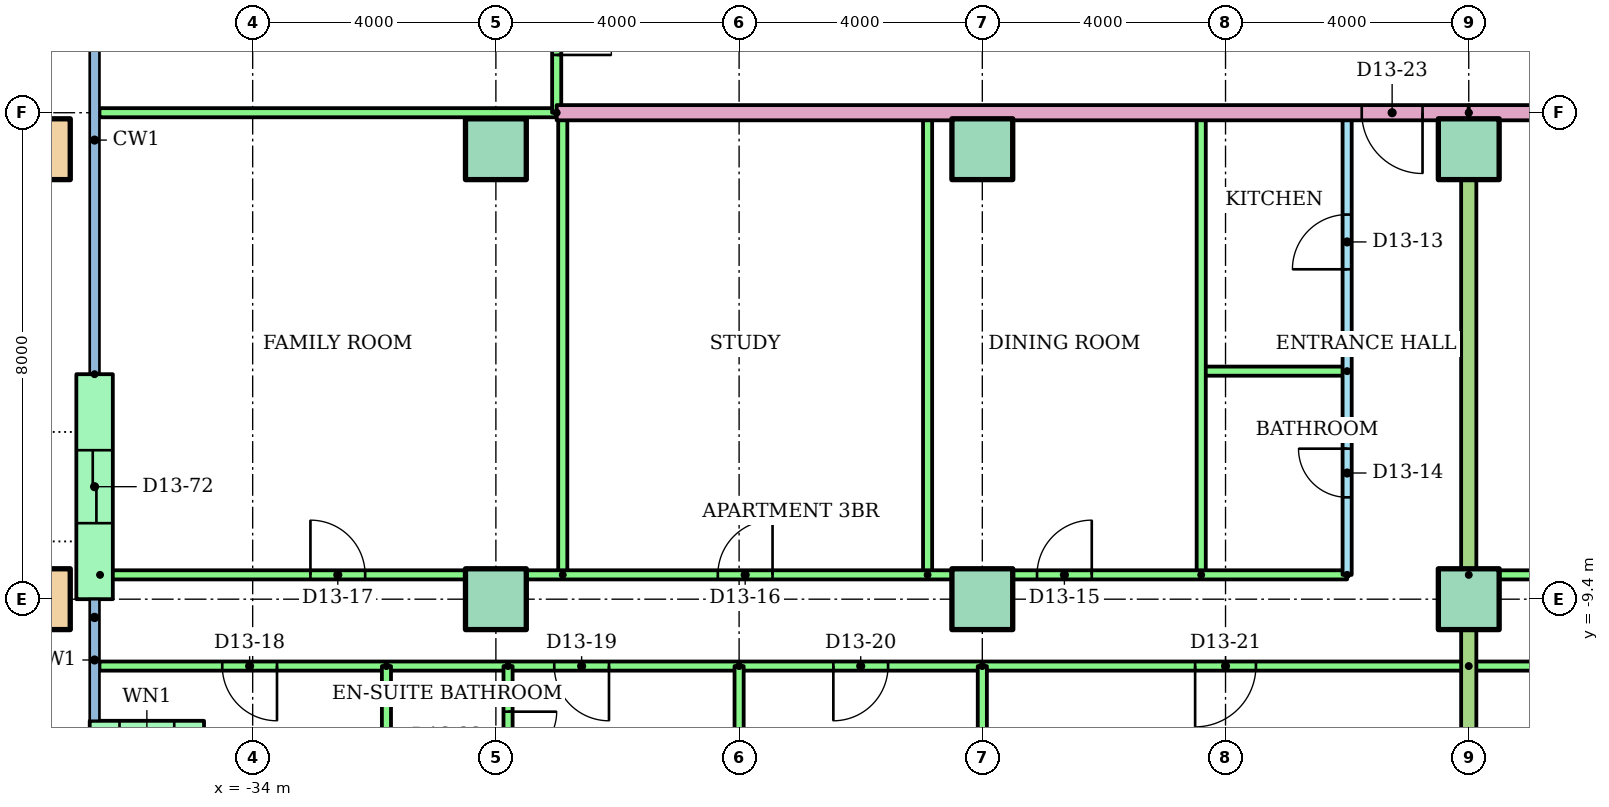
"""IFC4 building model, lengths in metres.
Left out: names, types, materials, properties, quantities, classifications, styles, units other than length and angle.
Written with IfcOpenShell. Run it as: python <this file> out.ifc"""

import sys

from ifc_helpers import new_model, si_unit, direction, frame, frame_2d, origin, origin_2d, place, context, subcontext, project, spatial, rectangle, hollow_rectangle, extrude, element, fill, save


model = new_model("IFC4")
c1 = context("Model", 3, precision=1e-05, world=origin(), true_north=direction((0.0, 1.0)))
c2 = subcontext(c1, "Body", "Model", "MODEL_VIEW")
j1 = project(units=[si_unit("LENGTHUNIT", "METRE"), si_unit("PLANEANGLEUNIT", "RADIAN")], contexts=[c1])
p1 = place(None, origin())
s1 = spatial("IfcSite", under=j1, at=p1, CompositionType="ELEMENT")
p2 = place(p1, origin())
s2 = spatial("IfcBuilding", under=s1, at=p2, CompositionType="ELEMENT")
p3 = place(p2, frame((0.0, 0.0, 51.2)))
s3 = spatial("IfcBuildingStorey", under=s2, at=p3, CompositionType="ELEMENT", Elevation=51.2)
p4 = place(p3, frame((-37.5, -9.4, 0.0)))
e1 = element("IfcColumn", 1, at=p4, inside=s3, PredefinedType="COLUMN", context=c2, shape_type="SweptSolid", body=[
    extrude(hollow_rectangle(XDim=1.0, YDim=1.0, WallThickness=0.05, at=origin_2d()), origin(), (0.0, 0.0, 1.0), 3.2),
])
for number, where in (
    (2, (-30.0, -9.4, 0.0)),
    (3, (-22.0, -9.4, 0.0)),
    (4, (-14.0, -9.4, 0.0)),
):
    element("IfcColumn", number, at=place(p3, frame(where)), inside=s3, PredefinedType="COLUMN", context=c2, shape_type="SweptSolid", body=[
        extrude(rectangle(XDim=1.0, YDim=1.0, at=origin_2d()), origin(), (0.0, 0.0, 1.0), 3.2),
    ])
p5 = place(p3, frame((-37.5, -2.0, 0.0)))
e5 = element("IfcColumn", 5, at=p5, inside=s3, PredefinedType="COLUMN", context=c2, shape_type="SweptSolid", body=[
    extrude(hollow_rectangle(XDim=1.0, YDim=1.0, WallThickness=0.05, at=origin_2d()), origin(), (0.0, 0.0, 1.0), 3.2),
])
for number, where in (
    (6, (-30.0, -2.0, 0.0)),
    (7, (-22.0, -2.0, 0.0)),
    (8, (-14.0, -2.0, 0.0)),
):
    element("IfcColumn", number, at=place(p3, frame(where)), inside=s3, PredefinedType="COLUMN", context=c2, shape_type="SweptSolid", body=[
        extrude(rectangle(XDim=1.0, YDim=1.0, at=origin_2d()), origin(), (0.0, 0.0, 1.0), 3.2),
    ])
p6 = place(p3, frame((-36.6, -5.7, 0.0), z_axis=(0.0, 0.0, 1.0), x_axis=(0.0, -1.0, 0.0)))
e9 = element("IfcWall", 9, at=p6, inside=s3, PredefinedType="STANDARD", context=c2, shape_type="SweptSolid", body=[
    extrude(rectangle(XDim=3.7, YDim=0.6, at=frame_2d((1.85, 0.0))), origin(), (0.0, 0.0, 1.0), 2.92),
])
p7 = place(p6, frame((1.25, 0.0, 0.0)))
e10 = element("IfcOpeningElement", 10, at=p7, cuts=e9, PredefinedType="OPENING", context=c2, shape_type="SweptSolid", body=[
    extrude(rectangle(XDim=1.2, YDim=2.1, at=frame_2d((0.6, 1.05))), frame((0.0, 0.31, 0.0), z_axis=(0.0, -1.0, 0.0), x_axis=(1.0, 0.0, 0.0)), (0.0, 0.0, 1.0), 0.62),
])
p8 = place(p3, frame((-36.68, -11.7, 0.0)))
e11 = element("IfcWall", 11, at=p8, inside=s3, PredefinedType="STANDARD", context=c2, shape_type="SweptSolid", body=[
    extrude(rectangle(XDim=1.88, YDim=0.6, at=frame_2d((0.94, 0.0))), origin(), (0.0, 0.0, 1.0), 2.92),
])
p9 = place(p8, frame((0.49, 0.0, 0.9)))
e12 = element("IfcOpeningElement", 12, at=p9, cuts=e11, PredefinedType="OPENING", context=c2, shape_type="SweptSolid", body=[
    extrude(rectangle(XDim=0.9, YDim=1.5, at=frame_2d((0.45, 0.75))), frame((0.0, 0.31, 0.0), z_axis=(0.0, -1.0, 0.0), x_axis=(1.0, 0.0, 0.0)), (0.0, 0.0, 1.0), 0.62),
])
p10 = place(p3, frame((-16.0, -9.0, 0.0), z_axis=(0.0, 0.0, 1.0), x_axis=(0.0, 1.0, 0.0)))
e13 = element("IfcWall", 13, at=p10, inside=s3, PredefinedType="PARTITIONING", context=c2, shape_type="SweptSolid", body=[
    extrude(rectangle(XDim=7.6, YDim=0.15, at=frame_2d((3.8, 0.0))), origin(), (0.0, 0.0, 1.0), 2.4),
])
p11 = place(p10, frame((5.025, 0.0, 0.0)))
e14 = element("IfcOpeningElement", 14, at=p11, cuts=e13, PredefinedType="OPENING", context=c2, shape_type="SweptSolid", body=[
    extrude(rectangle(XDim=0.9, YDim=2.1, at=frame_2d((0.45, 1.05))), frame((0.0, 0.085, 0.0), z_axis=(0.0, -1.0, 0.0), x_axis=(1.0, 0.0, 0.0)), (0.0, 0.0, 1.0), 0.17),
])
p12 = place(p10, frame((1.275, 0.0, 0.0)))
e15 = element("IfcOpeningElement", 15, at=p12, cuts=e13, PredefinedType="OPENING", context=c2, shape_type="SweptSolid", body=[
    extrude(rectangle(XDim=0.8, YDim=2.1, at=frame_2d((0.4, 1.05))), frame((0.0, 0.085, 0.0), z_axis=(0.0, -1.0, 0.0), x_axis=(1.0, 0.0, 0.0)), (0.0, 0.0, 1.0), 0.17),
])
p13 = place(p3, frame((-16.0, -5.65, 0.0), z_axis=(0.0, 0.0, 1.0), x_axis=(-1.0, 0.0, 0.0)))
e16 = element("IfcWall", 16, at=p13, inside=s3, PredefinedType="PARTITIONING", context=c2, shape_type="SweptSolid", body=[
    extrude(rectangle(XDim=2.4, YDim=0.15, at=frame_2d((1.2, 0.0))), origin(), (0.0, 0.0, 1.0), 2.4),
])
for number, where, z_axis, x_axis in (
    (17, (-18.4, -9.0, 0.0), (0.0, 0.0, 1.0), (0.0, 1.0, 0.0)),
    (18, (-22.9, -9.0, 0.0), (0.0, 0.0, 1.0), (0.0, 1.0, 0.0)),
    (19, (-28.9, -9.0, 0.0), (0.0, 0.0, 1.0), (0.0, 1.0, 0.0)),
):
    element("IfcWall", number, at=place(p3, frame(where, z_axis=z_axis, x_axis=x_axis)), inside=s3, PredefinedType="PARTITIONING", context=c2, shape_type="SweptSolid", body=[
        extrude(rectangle(XDim=7.6, YDim=0.15, at=frame_2d((3.8, 0.0))), origin(), (0.0, 0.0, 1.0), 2.4),
    ])
p14 = place(p3, frame((-36.51, -9.0, 0.0)))
e20 = element("IfcWall", 20, at=p14, inside=s3, PredefinedType="PARTITIONING", context=c2, shape_type="SweptSolid", body=[
    extrude(rectangle(XDim=20.51, YDim=0.15, at=frame_2d((10.255, 0.0))), origin(), (0.0, 0.0, 1.0), 2.4),
])
p15 = place(p14, frame((15.41, 0.0, 0.0)))
e21 = element("IfcOpeningElement", 21, at=p15, cuts=e20, PredefinedType="OPENING", context=c2, shape_type="SweptSolid", body=[
    extrude(rectangle(XDim=0.9, YDim=2.1, at=frame_2d((0.45, 1.05))), frame((0.0, 0.085, 0.0), z_axis=(0.0, -1.0, 0.0), x_axis=(1.0, 0.0, 0.0)), (0.0, 0.0, 1.0), 0.17),
])
p16 = place(p14, frame((10.16, 0.0, 0.0)))
e22 = element("IfcOpeningElement", 22, at=p16, cuts=e20, PredefinedType="OPENING", context=c2, shape_type="SweptSolid", body=[
    extrude(rectangle(XDim=0.9, YDim=2.1, at=frame_2d((0.45, 1.05))), frame((0.0, 0.085, 0.0), z_axis=(0.0, -1.0, 0.0), x_axis=(1.0, 0.0, 0.0)), (0.0, 0.0, 1.0), 0.17),
])
p17 = place(p14, frame((3.46, 0.0, 0.0)))
e23 = element("IfcOpeningElement", 23, at=p17, cuts=e20, PredefinedType="OPENING", context=c2, shape_type="SweptSolid", body=[
    extrude(rectangle(XDim=0.9, YDim=2.1, at=frame_2d((0.45, 1.05))), frame((0.0, 0.085, 0.0), z_axis=(0.0, -1.0, 0.0), x_axis=(1.0, 0.0, 0.0)), (0.0, 0.0, 1.0), 0.17),
])
p18 = place(p3, frame((-14.0, -10.5, 0.0), z_axis=(0.0, 0.0, 1.0), x_axis=(-1.0, 0.0, 0.0)))
e24 = element("IfcWall", 24, at=p18, inside=s3, PredefinedType="PARTITIONING", context=c2, shape_type="SweptSolid", body=[
    extrude(rectangle(XDim=22.52, YDim=0.15, at=frame_2d((11.26, 0.0))), origin(), (0.0, 0.0, 1.0), 2.4),
])
p19 = place(p18, frame((19.6, 0.0, 0.0)))
e25 = element("IfcOpeningElement", 25, at=p19, cuts=e24, PredefinedType="OPENING", context=c2, shape_type="SweptSolid", body=[
    extrude(rectangle(XDim=0.9, YDim=2.1, at=frame_2d((0.45, 1.05))), frame((0.0, 0.085, 0.0), z_axis=(0.0, -1.0, 0.0), x_axis=(1.0, 0.0, 0.0)), (0.0, 0.0, 1.0), 0.17),
])
p20 = place(p18, frame((14.14, 0.0, 0.0)))
e26 = element("IfcOpeningElement", 26, at=p20, cuts=e24, PredefinedType="OPENING", context=c2, shape_type="SweptSolid", body=[
    extrude(rectangle(XDim=0.9, YDim=2.1, at=frame_2d((0.45, 1.05))), frame((0.0, 0.085, 0.0), z_axis=(0.0, -1.0, 0.0), x_axis=(1.0, 0.0, 0.0)), (0.0, 0.0, 1.0), 0.17),
])
p21 = place(p18, frame((9.55, 0.0, 0.0)))
e27 = element("IfcOpeningElement", 27, at=p21, cuts=e24, PredefinedType="OPENING", context=c2, shape_type="SweptSolid", body=[
    extrude(rectangle(XDim=0.9, YDim=2.1, at=frame_2d((0.45, 1.05))), frame((0.0, 0.085, 0.0), z_axis=(0.0, -1.0, 0.0), x_axis=(1.0, 0.0, 0.0)), (0.0, 0.0, 1.0), 0.17),
])
p22 = place(p18, frame((3.5, 0.0, 0.0)))
e28 = element("IfcOpeningElement", 28, at=p22, cuts=e24, PredefinedType="OPENING", context=c2, shape_type="SweptSolid", body=[
    extrude(rectangle(XDim=1.0, YDim=2.1, at=frame_2d((0.5, 1.05))), frame((0.0, 0.085, 0.0), z_axis=(0.0, -1.0, 0.0), x_axis=(1.0, 0.0, 0.0)), (0.0, 0.0, 1.0), 0.17),
])
p23 = place(p3, frame((-31.8, -10.5, 0.0), z_axis=(0.0, 0.0, 1.0), x_axis=(0.0, -1.0, 0.0)))
e29 = element("IfcWall", 29, at=p23, inside=s3, PredefinedType="PARTITIONING", context=c2, shape_type="SweptSolid", body=[
    extrude(rectangle(XDim=3.82, YDim=0.15, at=frame_2d((1.91, 0.0))), origin(), (0.0, 0.0, 1.0), 2.4),
])
p24 = place(p3, frame((-26.0, -10.5, 0.0), z_axis=(0.0, 0.0, 1.0), x_axis=(0.0, -1.0, 0.0)))
e30 = element("IfcWall", 30, at=p24, inside=s3, PredefinedType="PARTITIONING", context=c2, shape_type="SweptSolid", body=[
    extrude(rectangle(XDim=5.621, YDim=0.15, at=frame_2d((2.811, 0.0))), origin(), (0.0, 0.0, 1.0), 2.4),
])
p25 = place(p3, frame((-22.0, -10.5, 0.0), z_axis=(0.0, 0.0, 1.0), x_axis=(0.0, -1.0, 0.0)))
e31 = element("IfcWall", 31, at=p25, inside=s3, PredefinedType="PARTITIONING", context=c2, shape_type="SweptSolid", body=[
    extrude(rectangle(XDim=5.61, YDim=0.15, at=frame_2d((2.805, 0.0))), origin(), (0.0, 0.0, 1.0), 2.4),
])
p26 = place(p3, frame((-29.8, -10.5, 0.0), z_axis=(0.0, 0.0, 1.0), x_axis=(0.0, -1.0, 0.0)))
e32 = element("IfcWall", 32, at=p26, inside=s3, PredefinedType="PARTITIONING", context=c2, shape_type="SweptSolid", body=[
    extrude(rectangle(XDim=2.3, YDim=0.15, at=frame_2d((1.15, 0.0))), origin(), (0.0, 0.0, 1.0), 2.4),
])
p27 = place(p26, frame((0.75, 0.0, 0.0)))
e33 = element("IfcOpeningElement", 33, at=p27, cuts=e32, PredefinedType="OPENING", context=c2, shape_type="SweptSolid", body=[
    extrude(rectangle(XDim=0.8, YDim=2.1, at=frame_2d((0.4, 1.05))), frame((0.0, 0.085, 0.0), z_axis=(0.0, -1.0, 0.0), x_axis=(1.0, 0.0, 0.0)), (0.0, 0.0, 1.0), 0.17),
])
p28 = place(p3, frame((-14.0, -9.0, 0.0)))
e34 = element("IfcWall", 34, at=p28, inside=s3, PredefinedType="PARTITIONING", context=c2, shape_type="SweptSolid", body=[
    extrude(rectangle(XDim=22.0, YDim=0.15, at=frame_2d((11.0, 0.0))), origin(), (0.0, 0.0, 1.0), 2.4),
])
p29 = place(p28, frame((16.76, 0.0, 0.0)))
e35 = element("IfcOpeningElement", 35, at=p29, cuts=e34, PredefinedType="OPENING", context=c2, shape_type="SweptSolid", body=[
    extrude(rectangle(XDim=0.9, YDim=2.1, at=frame_2d((0.45, 1.05))), frame((0.0, 0.085, 0.0), z_axis=(0.0, -1.0, 0.0), x_axis=(1.0, 0.0, 0.0)), (0.0, 0.0, 1.0), 0.17),
])
p30 = place(p28, frame((10.9, 0.0, 0.0)))
e36 = element("IfcOpeningElement", 36, at=p30, cuts=e34, PredefinedType="OPENING", context=c2, shape_type="SweptSolid", body=[
    extrude(rectangle(XDim=0.9, YDim=2.1, at=frame_2d((0.45, 1.05))), frame((0.0, 0.085, 0.0), z_axis=(0.0, -1.0, 0.0), x_axis=(1.0, 0.0, 0.0)), (0.0, 0.0, 1.0), 0.17),
])
p31 = place(p28, frame((3.6, 0.0, 0.0)))
e37 = element("IfcOpeningElement", 37, at=p31, cuts=e34, PredefinedType="OPENING", context=c2, shape_type="SweptSolid", body=[
    extrude(rectangle(XDim=0.9, YDim=2.1, at=frame_2d((0.45, 1.05))), frame((0.0, 0.085, 0.0), z_axis=(0.0, -1.0, 0.0), x_axis=(1.0, 0.0, 0.0)), (0.0, 0.0, 1.0), 0.17),
])
p32 = place(p3, frame((10.0, -10.5, 0.0), z_axis=(0.0, 0.0, 1.0), x_axis=(-1.0, 0.0, 0.0)))
e38 = element("IfcWall", 38, at=p32, inside=s3, PredefinedType="PARTITIONING", context=c2, shape_type="SweptSolid", body=[
    extrude(rectangle(XDim=24.0, YDim=0.15, at=frame_2d((12.0, 0.0))), origin(), (0.0, 0.0, 1.0), 2.4),
])
p33 = place(p32, frame((19.5, 0.0, 0.0)))
e39 = element("IfcOpeningElement", 39, at=p33, cuts=e38, PredefinedType="OPENING", context=c2, shape_type="SweptSolid", body=[
    extrude(rectangle(XDim=1.0, YDim=2.1, at=frame_2d((0.5, 1.05))), frame((0.0, 0.085, 0.0), z_axis=(0.0, -1.0, 0.0), x_axis=(1.0, 0.0, 0.0)), (0.0, 0.0, 1.0), 0.17),
])
p34 = place(p32, frame((13.55, 0.0, 0.0)))
e40 = element("IfcOpeningElement", 40, at=p34, cuts=e38, PredefinedType="OPENING", context=c2, shape_type="SweptSolid", body=[
    extrude(rectangle(XDim=0.9, YDim=2.1, at=frame_2d((0.45, 1.05))), frame((0.0, 0.085, 0.0), z_axis=(0.0, -1.0, 0.0), x_axis=(1.0, 0.0, 0.0)), (0.0, 0.0, 1.0), 0.17),
])
p35 = place(p32, frame((9.55, 0.0, 0.0)))
e41 = element("IfcOpeningElement", 41, at=p35, cuts=e38, PredefinedType="OPENING", context=c2, shape_type="SweptSolid", body=[
    extrude(rectangle(XDim=0.9, YDim=2.1, at=frame_2d((0.45, 1.05))), frame((0.0, 0.085, 0.0), z_axis=(0.0, -1.0, 0.0), x_axis=(1.0, 0.0, 0.0)), (0.0, 0.0, 1.0), 0.17),
])
p36 = place(p32, frame((5.55, 0.0, 0.0)))
e42 = element("IfcOpeningElement", 42, at=p36, cuts=e38, PredefinedType="OPENING", context=c2, shape_type="SweptSolid", body=[
    extrude(rectangle(XDim=0.9, YDim=2.1, at=frame_2d((0.45, 1.05))), frame((0.0, 0.085, 0.0), z_axis=(0.0, -1.0, 0.0), x_axis=(1.0, 0.0, 0.0)), (0.0, 0.0, 1.0), 0.17),
])
p37 = place(p32, frame((1.55, 0.0, 0.0)))
e43 = element("IfcOpeningElement", 43, at=p37, cuts=e38, PredefinedType="OPENING", context=c2, shape_type="SweptSolid", body=[
    extrude(rectangle(XDim=0.9, YDim=2.1, at=frame_2d((0.45, 1.05))), frame((0.0, 0.085, 0.0), z_axis=(0.0, -1.0, 0.0), x_axis=(1.0, 0.0, 0.0)), (0.0, 0.0, 1.0), 0.17),
])
p38 = place(p3, frame((-14.0, -1.4, 0.0), z_axis=(0.0, 0.0, 1.0), x_axis=(0.0, -1.0, 0.0)))
e44 = element("IfcWall", 44, at=p38, inside=s3, PredefinedType="PARTITIONING", context=c2, shape_type="SweptSolid", body=[
    extrude(rectangle(XDim=14.71, YDim=0.25, at=frame_2d((7.355, 0.0))), origin(), (0.0, 0.0, 1.0), 2.4),
])
p39 = place(p3, frame((-14.0, -1.4, 0.0), z_axis=(0.0, 0.0, 1.0), x_axis=(-1.0, 0.0, 0.0)))
e45 = element("IfcWall", 45, at=p39, inside=s3, PredefinedType="PARTITIONING", context=c2, shape_type="SweptSolid", body=[
    extrude(rectangle(XDim=15.0, YDim=0.25, at=frame_2d((7.5, 0.0))), origin(), (0.0, 0.0, 1.0), 2.4),
])
p40 = place(p39, frame((0.76, 0.0, 0.0)))
e46 = element("IfcOpeningElement", 46, at=p40, cuts=e45, PredefinedType="OPENING", context=c2, shape_type="SweptSolid", body=[
    extrude(rectangle(XDim=1.0, YDim=2.1, at=frame_2d((0.5, 1.05))), frame((0.0, 0.135, 0.0), z_axis=(0.0, -1.0, 0.0), x_axis=(1.0, 0.0, 0.0)), (0.0, 0.0, 1.0), 0.27),
])
p41 = place(p3, frame((-29.0, -1.4, 0.0), z_axis=(0.0, 0.0, 1.0), x_axis=(-1.0, 0.0, 0.0)))
e47 = element("IfcWall", 47, at=p41, inside=s3, PredefinedType="PARTITIONING", context=c2, shape_type="SweptSolid", body=[
    extrude(rectangle(XDim=7.52, YDim=0.15, at=frame_2d((3.76, 0.0))), origin(), (0.0, 0.0, 1.0), 2.4),
])
p42 = place(p3, frame((-29.0, 1.4, 0.0), z_axis=(0.0, 0.0, 1.0), x_axis=(0.0, -1.0, 0.0)))
e48 = element("IfcWall", 48, at=p42, inside=s3, PredefinedType="PARTITIONING", context=c2, shape_type="SweptSolid", body=[
    extrude(rectangle(XDim=2.8, YDim=0.15, at=frame_2d((1.4, 0.0))), origin(), (0.0, 0.0, 1.0), 2.4),
])
p43 = place(p42, frame((0.95, 0.0, 0.0)))
e49 = element("IfcOpeningElement", 49, at=p43, cuts=e48, PredefinedType="OPENING", context=c2, shape_type="SweptSolid", body=[
    extrude(rectangle(XDim=0.9, YDim=2.1, at=frame_2d((0.45, 1.05))), frame((0.0, 0.085, 0.0), z_axis=(0.0, -1.0, 0.0), x_axis=(1.0, 0.0, 0.0)), (0.0, 0.0, 1.0), 0.17),
])
p44 = place(p3, frame((14.0, -1.4, 0.0), z_axis=(0.0, 0.0, 1.0), x_axis=(-1.0, 0.0, 0.0)))
e50 = element("IfcWall", 50, at=p44, inside=s3, PredefinedType="PARTITIONING", context=c2, shape_type="SweptSolid", body=[
    extrude(rectangle(XDim=28.0, YDim=0.25, at=frame_2d((14.0, 0.0))), origin(), (0.0, 0.0, 1.0), 2.4),
])
p45 = place(p44, frame((4.76, 0.0, 0.0)))
e51 = element("IfcOpeningElement", 51, at=p45, cuts=e50, PredefinedType="OPENING", context=c2, shape_type="SweptSolid", body=[
    extrude(rectangle(XDim=1.0, YDim=2.1, at=frame_2d((0.5, 1.05))), frame((0.0, 0.135, 0.0), z_axis=(0.0, -1.0, 0.0), x_axis=(1.0, 0.0, 0.0)), (0.0, 0.0, 1.0), 0.27),
])
p46 = place(p44, frame((2.24, 0.0, 0.0)))
e52 = element("IfcOpeningElement", 52, at=p46, cuts=e50, PredefinedType="OPENING", context=c2, shape_type="SweptSolid", body=[
    extrude(rectangle(XDim=1.0, YDim=2.1, at=frame_2d((0.5, 1.05))), frame((0.0, 0.135, 0.0), z_axis=(0.0, -1.0, 0.0), x_axis=(1.0, 0.0, 0.0)), (0.0, 0.0, 1.0), 0.27),
])
p47 = place(p11, origin())
e53 = element("IfcDoor", 53, at=p47, inside=s3, OperationType="SINGLE_SWING_LEFT", PredefinedType="DOOR", context=c2, shape_type="SweptSolid", body=[
    extrude(rectangle(XDim=0.9, YDim=2.1, at=frame_2d((0.45, 1.05))), frame((0.0, 0.025, 0.0), z_axis=(0.0, -1.0, 0.0), x_axis=(1.0, 0.0, 0.0)), (0.0, 0.0, 1.0), 0.05),
])
fill(e14, e53)
p48 = place(p12, origin())
e54 = element("IfcDoor", 54, at=p48, inside=s3, OperationType="SINGLE_SWING_RIGHT", PredefinedType="DOOR", context=c2, shape_type="SweptSolid", body=[
    extrude(rectangle(XDim=0.8, YDim=2.1, at=frame_2d((0.4, 1.05))), frame((0.0, 0.025, 0.0), z_axis=(0.0, -1.0, 0.0), x_axis=(1.0, 0.0, 0.0)), (0.0, 0.0, 1.0), 0.05),
])
fill(e15, e54)
p49 = place(p15, origin())
e55 = element("IfcDoor", 55, at=p49, inside=s3, OperationType="SINGLE_SWING_RIGHT", PredefinedType="DOOR", context=c2, shape_type="SweptSolid", body=[
    extrude(rectangle(XDim=0.9, YDim=2.1, at=frame_2d((0.45, 1.05))), frame((0.0, 0.025, 0.0), z_axis=(0.0, -1.0, 0.0), x_axis=(1.0, 0.0, 0.0)), (0.0, 0.0, 1.0), 0.05),
])
fill(e21, e55)
p50 = place(p16, origin())
e56 = element("IfcDoor", 56, at=p50, inside=s3, OperationType="SINGLE_SWING_RIGHT", PredefinedType="DOOR", context=c2, shape_type="SweptSolid", body=[
    extrude(rectangle(XDim=0.9, YDim=2.1, at=frame_2d((0.45, 1.05))), frame((0.0, 0.025, 0.0), z_axis=(0.0, -1.0, 0.0), x_axis=(1.0, 0.0, 0.0)), (0.0, 0.0, 1.0), 0.05),
])
fill(e22, e56)
p51 = place(p17, origin())
e57 = element("IfcDoor", 57, at=p51, inside=s3, OperationType="SINGLE_SWING_LEFT", PredefinedType="DOOR", context=c2, shape_type="SweptSolid", body=[
    extrude(rectangle(XDim=0.9, YDim=2.1, at=frame_2d((0.45, 1.05))), frame((0.0, 0.025, 0.0), z_axis=(0.0, -1.0, 0.0), x_axis=(1.0, 0.0, 0.0)), (0.0, 0.0, 1.0), 0.05),
])
fill(e23, e57)
p52 = place(p19, origin())
e58 = element("IfcDoor", 58, at=p52, inside=s3, OperationType="SINGLE_SWING_LEFT", PredefinedType="DOOR", context=c2, shape_type="SweptSolid", body=[
    extrude(rectangle(XDim=0.9, YDim=2.1, at=frame_2d((0.45, 1.05))), frame((0.0, 0.025, 0.0), z_axis=(0.0, -1.0, 0.0), x_axis=(1.0, 0.0, 0.0)), (0.0, 0.0, 1.0), 0.05),
])
fill(e25, e58)
p53 = place(p20, origin())
e59 = element("IfcDoor", 59, at=p53, inside=s3, OperationType="SINGLE_SWING_LEFT", PredefinedType="DOOR", context=c2, shape_type="SweptSolid", body=[
    extrude(rectangle(XDim=0.9, YDim=2.1, at=frame_2d((0.45, 1.05))), frame((0.0, 0.025, 0.0), z_axis=(0.0, -1.0, 0.0), x_axis=(1.0, 0.0, 0.0)), (0.0, 0.0, 1.0), 0.05),
])
fill(e26, e59)
p54 = place(p21, origin())
e60 = element("IfcDoor", 60, at=p54, inside=s3, OperationType="SINGLE_SWING_RIGHT", PredefinedType="DOOR", context=c2, shape_type="SweptSolid", body=[
    extrude(rectangle(XDim=0.9, YDim=2.1, at=frame_2d((0.45, 1.05))), frame((0.0, 0.025, 0.0), z_axis=(0.0, -1.0, 0.0), x_axis=(1.0, 0.0, 0.0)), (0.0, 0.0, 1.0), 0.05),
])
fill(e27, e60)
p55 = place(p22, origin())
e61 = element("IfcDoor", 61, at=p55, inside=s3, OperationType="SINGLE_SWING_RIGHT", PredefinedType="DOOR", context=c2, shape_type="SweptSolid", body=[
    extrude(rectangle(XDim=1.0, YDim=2.1, at=frame_2d((0.5, 1.05))), frame((0.0, 0.025, 0.0), z_axis=(0.0, -1.0, 0.0), x_axis=(1.0, 0.0, 0.0)), (0.0, 0.0, 1.0), 0.05),
])
fill(e28, e61)
p56 = place(p27, origin())
e62 = element("IfcDoor", 62, at=p56, inside=s3, OperationType="SINGLE_SWING_LEFT", PredefinedType="DOOR", context=c2, shape_type="SweptSolid", body=[
    extrude(rectangle(XDim=0.8, YDim=2.1, at=frame_2d((0.4, 1.05))), frame((0.0, 0.025, 0.0), z_axis=(0.0, -1.0, 0.0), x_axis=(1.0, 0.0, 0.0)), (0.0, 0.0, 1.0), 0.05),
])
fill(e33, e62)
p57 = place(p40, origin())
e63 = element("IfcDoor", 63, at=p57, inside=s3, OperationType="SINGLE_SWING_LEFT", PredefinedType="DOOR", context=c2, shape_type="SweptSolid", body=[
    extrude(rectangle(XDim=1.0, YDim=2.1, at=frame_2d((0.5, 1.05))), frame((0.0, 0.025, 0.0), z_axis=(0.0, -1.0, 0.0), x_axis=(1.0, 0.0, 0.0)), (0.0, 0.0, 1.0), 0.05),
])
fill(e46, e63)
p58 = place(p43, origin())
e64 = element("IfcDoor", 64, at=p58, inside=s3, OperationType="SINGLE_SWING_RIGHT", PredefinedType="DOOR", context=c2, shape_type="SweptSolid", body=[
    extrude(rectangle(XDim=0.9, YDim=2.1, at=frame_2d((0.45, 1.05))), frame((0.0, 0.025, 0.0), z_axis=(0.0, -1.0, 0.0), x_axis=(1.0, 0.0, 0.0)), (0.0, 0.0, 1.0), 0.05),
])
fill(e49, e64)
p59 = place(p7, origin())
e65 = element("IfcDoor", 65, at=p59, inside=s3, OperationType="SLIDING_TO_LEFT", PredefinedType="DOOR", context=c2, shape_type="SweptSolid", body=[
    extrude(rectangle(XDim=1.2, YDim=2.1, at=frame_2d((0.6, 1.05))), frame((0.0, 0.025, 0.0), z_axis=(0.0, -1.0, 0.0), x_axis=(1.0, 0.0, 0.0)), (0.0, 0.0, 1.0), 0.05),
])
fill(e10, e65)
save(model, sys.argv[1])
